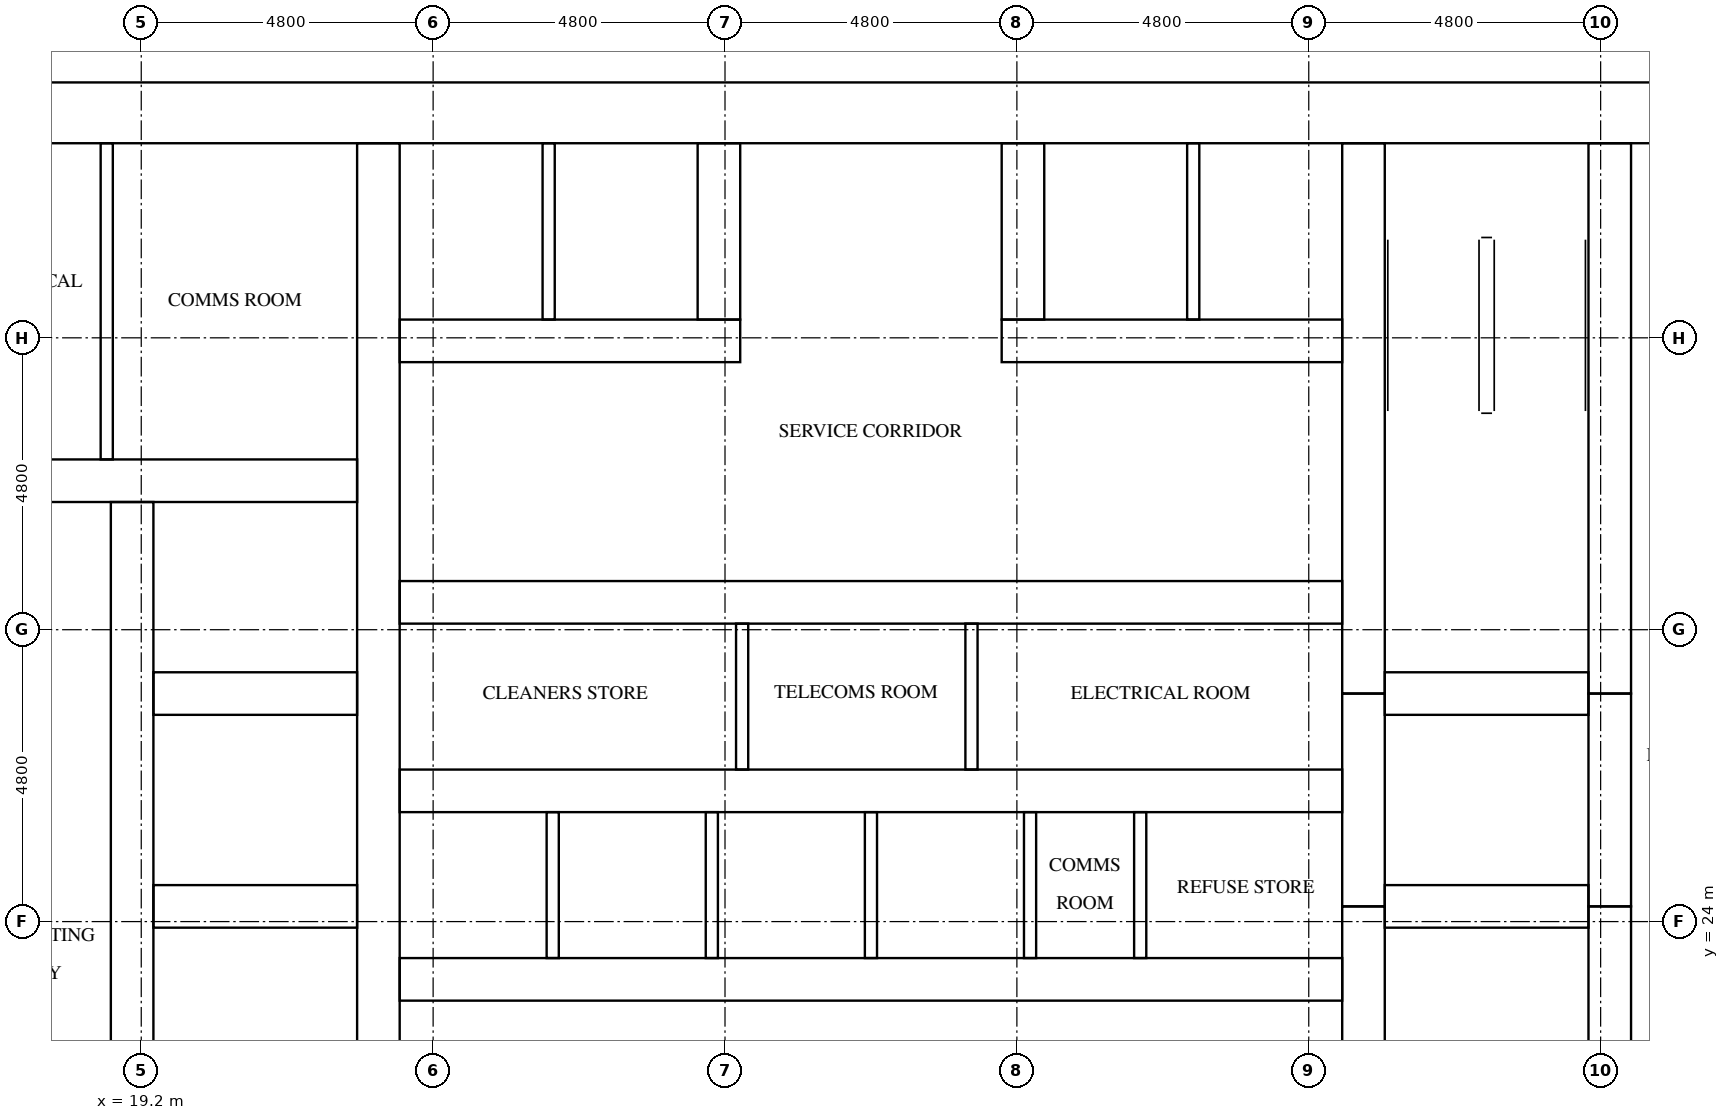
"""IFC4 building model, lengths in metres.
Left out: names, types, materials, properties, quantities, classifications, styles, units other than length and angle.
Written with IfcOpenShell. Run it as: python <this file> out.ifc"""

import sys

from ifc_helpers import new_model, si_unit, direction, frame, frame_2d, origin, place, context, subcontext, project, spatial, rectangle, extrude, element, fill, save


model = new_model("IFC4")
c1 = context("Model", 3, precision=1e-05, world=origin(), true_north=direction((0.0, 1.0)))
c2 = subcontext(c1, "Body", "Model", "MODEL_VIEW")
j1 = project(units=[si_unit("LENGTHUNIT", "METRE"), si_unit("PLANEANGLEUNIT", "RADIAN")], contexts=[c1])
p1 = place(None, origin())
s1 = spatial("IfcSite", under=j1, at=p1, CompositionType="ELEMENT")
p2 = place(p1, origin())
s2 = spatial("IfcBuilding", under=s1, at=p2, CompositionType="ELEMENT")
p3 = place(p2, frame((0.0, 0.0, 32.9)))
s3 = spatial("IfcBuildingStorey", under=s2, at=p3, CompositionType="ELEMENT", Elevation=32.9)
p4 = place(p3, frame((15.0, 37.3, 0.0), z_axis=(0.0, 0.0, 1.0), x_axis=(1.0, 0.0, 0.0)))
e1 = element("IfcWall", 1, at=p4, inside=s3, PredefinedType="SHEAR", context=c2, shape_type="SweptSolid", body=[
    extrude(rectangle(XDim=32.4, YDim=1.0, at=frame_2d((16.2, 0.0))), origin(), (0.0, 0.0, 1.0), 3.2),
])
p5 = place(p4, frame((15.3, 0.0, 0.0)))
e2 = element("IfcOpeningElement", 2, at=p5, cuts=e1, PredefinedType="OPENING", context=c2, shape_type="SweptSolid", body=[
    extrude(rectangle(XDim=1.8, YDim=2.1, at=frame_2d((0.9, 1.05))), frame((0.0, 0.51, 0.0), z_axis=(0.0, -1.0, 0.0), x_axis=(1.0, 0.0, 0.0)), (0.0, 0.0, 1.0), 1.02),
])
p6 = place(p4, frame((1.766, 0.0, 0.0)))
e3 = element("IfcOpeningElement", 3, at=p6, cuts=e1, PredefinedType="OPENING", context=c2, shape_type="SweptSolid", body=[
    extrude(rectangle(XDim=1.0, YDim=2.1, at=frame_2d((0.5, 1.05))), frame((0.0, 0.51, 0.0), z_axis=(0.0, -1.0, 0.0), x_axis=(1.0, 0.0, 0.0)), (0.0, 0.0, 1.0), 1.02),
])
p7 = place(p4, frame((5.241, 0.0, 0.0)))
e4 = element("IfcOpeningElement", 4, at=p7, cuts=e1, PredefinedType="OPENING", context=c2, shape_type="SweptSolid", body=[
    extrude(rectangle(XDim=1.0, YDim=2.1, at=frame_2d((0.5, 1.05))), frame((0.0, 0.51, 0.0), z_axis=(0.0, -1.0, 0.0), x_axis=(1.0, 0.0, 0.0)), (0.0, 0.0, 1.0), 1.02),
])
p8 = place(p3, frame((19.05, 16.0, 0.0), z_axis=(0.0, 0.0, 1.0), x_axis=(0.0, 1.0, 0.0)))
e5 = element("IfcWall", 5, at=p8, inside=s3, PredefinedType="SHEAR", context=c2, shape_type="SweptSolid", body=[
    extrude(rectangle(XDim=14.9, YDim=0.7, at=frame_2d((7.45, 0.0))), origin(), (0.0, 0.0, 1.0), 3.2),
])
p9 = place(p8, frame((9.45, 0.0, 0.0)))
e6 = element("IfcOpeningElement", 6, at=p9, cuts=e5, PredefinedType="OPENING", context=c2, shape_type="SweptSolid", body=[
    extrude(rectangle(XDim=1.1, YDim=2.1, at=frame_2d((0.55, 1.05))), frame((0.0, 0.36, 0.0), z_axis=(0.0, -1.0, 0.0), x_axis=(1.0, 0.0, 0.0)), (0.0, 0.0, 1.0), 0.72),
])
p10 = place(p8, frame((12.95, 0.0, 0.0)))
e7 = element("IfcOpeningElement", 7, at=p10, cuts=e5, PredefinedType="OPENING", context=c2, shape_type="SweptSolid", body=[
    extrude(rectangle(XDim=1.1, YDim=2.1, at=frame_2d((0.55, 1.05))), frame((0.0, 0.36, 0.0), z_axis=(0.0, -1.0, 0.0), x_axis=(1.0, 0.0, 0.0)), (0.0, 0.0, 1.0), 0.72),
])
p11 = place(p8, frame((0.2, 0.0, 0.0)))
e8 = element("IfcOpeningElement", 8, at=p11, cuts=e5, PredefinedType="OPENING", context=c2, shape_type="SweptSolid", body=[
    extrude(rectangle(XDim=1.2, YDim=2.1, at=frame_2d((0.6, 1.05))), frame((0.0, 0.36, 0.0), z_axis=(0.0, -1.0, 0.0), x_axis=(1.0, 0.0, 0.0)), (0.0, 0.0, 1.0), 0.72),
])
p12 = place(p3, frame((23.1, 16.0, 0.0), z_axis=(0.0, 0.0, 1.0), x_axis=(0.0, 1.0, 0.0)))
e9 = element("IfcWall", 9, at=p12, inside=s3, PredefinedType="SHEAR", context=c2, shape_type="SweptSolid", body=[
    extrude(rectangle(XDim=20.8, YDim=0.7, at=frame_2d((10.4, 0.0))), origin(), (0.0, 0.0, 1.0), 3.2),
])
p13 = place(p3, frame((39.3, 16.0, 0.0), z_axis=(0.0, 0.0, 1.0), x_axis=(0.0, 1.0, 0.0)))
e10 = element("IfcWall", 10, at=p13, inside=s3, PredefinedType="SHEAR", context=c2, shape_type="SweptSolid", body=[
    extrude(rectangle(XDim=8.25, YDim=0.7, at=frame_2d((4.125, 0.0))), origin(), (0.0, 0.0, 1.0), 3.2),
])
p14 = place(p3, frame((39.3, 24.25, 0.0), z_axis=(0.0, 0.0, 1.0), x_axis=(0.0, 1.0, 0.0)))
e11 = element("IfcWall", 11, at=p14, inside=s3, PredefinedType="SHEAR", context=c2, shape_type="SweptSolid", body=[
    extrude(rectangle(XDim=3.5, YDim=0.7, at=frame_2d((1.75, 0.0))), origin(), (0.0, 0.0, 1.0), 3.2),
])
p15 = place(p3, frame((39.3, 27.75, 0.0), z_axis=(0.0, 0.0, 1.0), x_axis=(0.0, 1.0, 0.0)))
e12 = element("IfcWall", 12, at=p15, inside=s3, PredefinedType="SHEAR", context=c2, shape_type="SweptSolid", body=[
    extrude(rectangle(XDim=9.05, YDim=0.7, at=frame_2d((4.525, 0.0))), origin(), (0.0, 0.0, 1.0), 3.2),
])
p16 = place(p3, frame((43.35, 16.0, 0.0), z_axis=(0.0, 0.0, 1.0), x_axis=(0.0, 1.0, 0.0)))
e13 = element("IfcWall", 13, at=p16, inside=s3, PredefinedType="SHEAR", context=c2, shape_type="SweptSolid", body=[
    extrude(rectangle(XDim=8.25, YDim=0.7, at=frame_2d((4.125, 0.0))), origin(), (0.0, 0.0, 1.0), 3.2),
])
p17 = place(p16, frame((0.2, 0.0, 0.0)))
e14 = element("IfcOpeningElement", 14, at=p17, cuts=e13, PredefinedType="OPENING", context=c2, shape_type="SweptSolid", body=[
    extrude(rectangle(XDim=1.2, YDim=2.1, at=frame_2d((0.6, 1.05))), frame((0.0, 0.36, 0.0), z_axis=(0.0, -1.0, 0.0), x_axis=(1.0, 0.0, 0.0)), (0.0, 0.0, 1.0), 0.72),
])
p18 = place(p3, frame((43.35, 24.25, 0.0), z_axis=(0.0, 0.0, 1.0), x_axis=(0.0, 1.0, 0.0)))
e15 = element("IfcWall", 15, at=p18, inside=s3, PredefinedType="SHEAR", context=c2, shape_type="SweptSolid", body=[
    extrude(rectangle(XDim=3.5, YDim=0.7, at=frame_2d((1.75, 0.0))), origin(), (0.0, 0.0, 1.0), 3.2),
])
p19 = place(p18, frame((1.2, 0.0, 0.0)))
e16 = element("IfcOpeningElement", 16, at=p19, cuts=e15, PredefinedType="OPENING", context=c2, shape_type="SweptSolid", body=[
    extrude(rectangle(XDim=1.1, YDim=2.1, at=frame_2d((0.55, 1.05))), frame((0.0, 0.36, 0.0), z_axis=(0.0, -1.0, 0.0), x_axis=(1.0, 0.0, 0.0)), (0.0, 0.0, 1.0), 0.72),
])
p20 = place(p3, frame((43.35, 27.75, 0.0), z_axis=(0.0, 0.0, 1.0), x_axis=(0.0, 1.0, 0.0)))
e17 = element("IfcWall", 17, at=p20, inside=s3, PredefinedType="SHEAR", context=c2, shape_type="SweptSolid", body=[
    extrude(rectangle(XDim=9.05, YDim=0.7, at=frame_2d((4.525, 0.0))), origin(), (0.0, 0.0, 1.0), 3.2),
])
p21 = place(p20, frame((7.65, 0.0, 0.0)))
e18 = element("IfcOpeningElement", 18, at=p21, cuts=e17, PredefinedType="OPENING", context=c2, shape_type="SweptSolid", body=[
    extrude(rectangle(XDim=1.2, YDim=2.1, at=frame_2d((0.6, 1.05))), frame((0.0, 0.36, 0.0), z_axis=(0.0, -1.0, 0.0), x_axis=(1.0, 0.0, 0.0)), (0.0, 0.0, 1.0), 0.72),
])
for number, where, z_axis, x_axis in (
    (19, (19.4, 24.25, 0.0), (0.0, 0.0, 1.0), (1.0, 0.0, 0.0)),
    (20, (19.4, 27.75, 0.0), (0.0, 0.0, 1.0), (1.0, 0.0, 0.0)),
):
    element("IfcWall", number, at=place(p3, frame(where, z_axis=z_axis, x_axis=x_axis)), inside=s3, PredefinedType="SHEAR", context=c2, shape_type="SweptSolid", body=[
        extrude(rectangle(XDim=3.35, YDim=0.7, at=frame_2d((1.675, 0.0))), origin(), (0.0, 0.0, 1.0), 3.2),
    ])
p22 = place(p3, frame((16.0, 31.25, 0.0), z_axis=(0.0, 0.0, 1.0), x_axis=(1.0, 0.0, 0.0)))
e21 = element("IfcWall", 21, at=p22, inside=s3, PredefinedType="SHEAR", context=c2, shape_type="SweptSolid", body=[
    extrude(rectangle(XDim=6.75, YDim=0.7, at=frame_2d((3.375, 0.0))), origin(), (0.0, 0.0, 1.0), 3.2),
])
for number, where, z_axis, x_axis in (
    (22, (39.65, 24.25, 0.0), (0.0, 0.0, 1.0), (1.0, 0.0, 0.0)),
    (23, (39.65, 27.75, 0.0), (0.0, 0.0, 1.0), (1.0, 0.0, 0.0)),
):
    element("IfcWall", number, at=place(p3, frame(where, z_axis=z_axis, x_axis=x_axis)), inside=s3, PredefinedType="SHEAR", context=c2, shape_type="SweptSolid", body=[
        extrude(rectangle(XDim=3.35, YDim=0.7, at=frame_2d((1.675, 0.0))), origin(), (0.0, 0.0, 1.0), 3.2),
    ])
p23 = place(p3, frame((23.45, 23.05, 0.0), z_axis=(0.0, 0.0, 1.0), x_axis=(1.0, 0.0, 0.0)))
e24 = element("IfcWall", 24, at=p23, inside=s3, PredefinedType="SHEAR", context=c2, shape_type="SweptSolid", body=[
    extrude(rectangle(XDim=15.5, YDim=0.7, at=frame_2d((7.75, 0.0))), origin(), (0.0, 0.0, 1.0), 3.2),
])
p24 = place(p23, frame((0.658, 0.0, 0.0)))
e25 = element("IfcOpeningElement", 25, at=p24, cuts=e24, PredefinedType="OPENING", context=c2, shape_type="SweptSolid", body=[
    extrude(rectangle(XDim=1.1, YDim=2.1, at=frame_2d((0.55, 1.05))), frame((0.0, 0.36, 0.0), z_axis=(0.0, -1.0, 0.0), x_axis=(1.0, 0.0, 0.0)), (0.0, 0.0, 1.0), 0.72),
])
p25 = place(p23, frame((3.275, 0.0, 0.0)))
e26 = element("IfcOpeningElement", 26, at=p25, cuts=e24, PredefinedType="OPENING", context=c2, shape_type="SweptSolid", body=[
    extrude(rectangle(XDim=1.1, YDim=2.1, at=frame_2d((0.55, 1.05))), frame((0.0, 0.36, 0.0), z_axis=(0.0, -1.0, 0.0), x_axis=(1.0, 0.0, 0.0)), (0.0, 0.0, 1.0), 0.72),
])
p26 = place(p23, frame((10.772, 0.0, 0.0)))
e27 = element("IfcOpeningElement", 27, at=p26, cuts=e24, PredefinedType="OPENING", context=c2, shape_type="SweptSolid", body=[
    extrude(rectangle(XDim=1.0, YDim=2.1, at=frame_2d((0.5, 1.05))), frame((0.0, 0.36, 0.0), z_axis=(0.0, -1.0, 0.0), x_axis=(1.0, 0.0, 0.0)), (0.0, 0.0, 1.0), 0.72),
])
p27 = place(p23, frame((13.389, 0.0, 0.0)))
e28 = element("IfcOpeningElement", 28, at=p27, cuts=e24, PredefinedType="OPENING", context=c2, shape_type="SweptSolid", body=[
    extrude(rectangle(XDim=1.0, YDim=2.1, at=frame_2d((0.5, 1.05))), frame((0.0, 0.36, 0.0), z_axis=(0.0, -1.0, 0.0), x_axis=(1.0, 0.0, 0.0)), (0.0, 0.0, 1.0), 0.72),
])
p28 = place(p3, frame((23.45, 26.15, 0.0), z_axis=(0.0, 0.0, 1.0), x_axis=(1.0, 0.0, 0.0)))
e29 = element("IfcWall", 29, at=p28, inside=s3, PredefinedType="SHEAR", context=c2, shape_type="SweptSolid", body=[
    extrude(rectangle(XDim=15.5, YDim=0.7, at=frame_2d((7.75, 0.0))), origin(), (0.0, 0.0, 1.0), 3.2),
])
p29 = place(p3, frame((23.45, 29.25, 0.0), z_axis=(0.0, 0.0, 1.0), x_axis=(1.0, 0.0, 0.0)))
e30 = element("IfcWall", 30, at=p29, inside=s3, PredefinedType="SHEAR", context=c2, shape_type="SweptSolid", body=[
    extrude(rectangle(XDim=15.5, YDim=0.7, at=frame_2d((7.75, 0.0))), origin(), (0.0, 0.0, 1.0), 3.2),
])
p30 = place(p29, frame((2.266, 0.0, 0.0)))
e31 = element("IfcOpeningElement", 31, at=p30, cuts=e30, PredefinedType="OPENING", context=c2, shape_type="SweptSolid", body=[
    extrude(rectangle(XDim=1.0, YDim=2.1, at=frame_2d((0.5, 1.05))), frame((0.0, 0.36, 0.0), z_axis=(0.0, -1.0, 0.0), x_axis=(1.0, 0.0, 0.0)), (0.0, 0.0, 1.0), 0.72),
])
p31 = place(p29, frame((7.018, 0.0, 0.0)))
e32 = element("IfcOpeningElement", 32, at=p31, cuts=e30, PredefinedType="OPENING", context=c2, shape_type="SweptSolid", body=[
    extrude(rectangle(XDim=1.0, YDim=2.1, at=frame_2d((0.5, 1.05))), frame((0.0, 0.36, 0.0), z_axis=(0.0, -1.0, 0.0), x_axis=(1.0, 0.0, 0.0)), (0.0, 0.0, 1.0), 0.72),
])
p32 = place(p29, frame((12.002, 0.0, 0.0)))
e33 = element("IfcOpeningElement", 33, at=p32, cuts=e30, PredefinedType="OPENING", context=c2, shape_type="SweptSolid", body=[
    extrude(rectangle(XDim=1.0, YDim=2.1, at=frame_2d((0.5, 1.05))), frame((0.0, 0.36, 0.0), z_axis=(0.0, -1.0, 0.0), x_axis=(1.0, 0.0, 0.0)), (0.0, 0.0, 1.0), 0.72),
])
p33 = place(p3, frame((23.45, 33.55, 0.0), z_axis=(0.0, 0.0, 1.0), x_axis=(1.0, 0.0, 0.0)))
e34 = element("IfcWall", 34, at=p33, inside=s3, PredefinedType="SHEAR", context=c2, shape_type="SweptSolid", body=[
    extrude(rectangle(XDim=5.6, YDim=0.7, at=frame_2d((2.8, 0.0))), origin(), (0.0, 0.0, 1.0), 3.2),
])
p34 = place(p3, frame((33.35, 33.55, 0.0), z_axis=(0.0, 0.0, 1.0), x_axis=(1.0, 0.0, 0.0)))
e35 = element("IfcWall", 35, at=p34, inside=s3, PredefinedType="SHEAR", context=c2, shape_type="SweptSolid", body=[
    extrude(rectangle(XDim=5.6, YDim=0.7, at=frame_2d((2.8, 0.0))), origin(), (0.0, 0.0, 1.0), 3.2),
])
for number, where, z_axis, x_axis in (
    (36, (28.7, 33.9, 0.0), (0.0, 0.0, 1.0), (0.0, 1.0, 0.0)),
    (37, (33.7, 33.9, 0.0), (0.0, 0.0, 1.0), (0.0, 1.0, 0.0)),
):
    element("IfcWall", number, at=place(p3, frame(where, z_axis=z_axis, x_axis=x_axis)), inside=s3, PredefinedType="SHEAR", context=c2, shape_type="SweptSolid", body=[
        extrude(rectangle(XDim=2.9, YDim=0.7, at=frame_2d((1.45, 0.0))), origin(), (0.0, 0.0, 1.0), 3.2),
    ])
for number, where, z_axis, x_axis in (
    (38, (25.967, 23.4, 0.0), (0.0, 0.0, 1.0), (0.0, 1.0, 0.0)),
    (39, (28.583, 23.4, 0.0), (0.0, 0.0, 1.0), (0.0, 1.0, 0.0)),
    (40, (31.2, 23.4, 0.0), (0.0, 0.0, 1.0), (0.0, 1.0, 0.0)),
    (41, (33.817, 23.4, 0.0), (0.0, 0.0, 1.0), (0.0, 1.0, 0.0)),
):
    element("IfcWall", number, at=place(p3, frame(where, z_axis=z_axis, x_axis=x_axis)), inside=s3, PredefinedType="SOLIDWALL", context=c2, shape_type="SweptSolid", body=[
        extrude(rectangle(XDim=2.4, YDim=0.2, at=frame_2d((1.2, 0.0))), origin(), (0.0, 0.0, 1.0), 3.2),
    ])
for number, where, z_axis, x_axis in (
    (42, (25.9, 33.9, 0.0), (0.0, 0.0, 1.0), (0.0, 1.0, 0.0)),
    (43, (36.5, 33.9, 0.0), (0.0, 0.0, 1.0), (0.0, 1.0, 0.0)),
):
    element("IfcWall", number, at=place(p3, frame(where, z_axis=z_axis, x_axis=x_axis)), inside=s3, PredefinedType="SOLIDWALL", context=c2, shape_type="SweptSolid", body=[
        extrude(rectangle(XDim=2.9, YDim=0.2, at=frame_2d((1.45, 0.0))), origin(), (0.0, 0.0, 1.0), 3.2),
    ])
p35 = place(p3, frame((18.633, 31.6, 0.0), z_axis=(0.0, 0.0, 1.0), x_axis=(0.0, 1.0, 0.0)))
e44 = element("IfcWall", 44, at=p35, inside=s3, PredefinedType="PARTITIONING", context=c2, shape_type="SweptSolid", body=[
    extrude(rectangle(XDim=5.2, YDim=0.2, at=frame_2d((2.6, 0.0))), origin(), (0.0, 0.0, 1.0), 3.2),
])
p36 = place(p3, frame((35.628, 23.4, 0.0), z_axis=(0.0, 0.0, 1.0), x_axis=(0.0, 1.0, 0.0)))
e45 = element("IfcWall", 45, at=p36, inside=s3, PredefinedType="PARTITIONING", context=c2, shape_type="SweptSolid", body=[
    extrude(rectangle(XDim=2.4, YDim=0.2, at=frame_2d((1.2, 0.0))), origin(), (0.0, 0.0, 1.0), 3.2),
])
for number, where, z_axis, x_axis in (
    (46, (29.082, 26.5, 0.0), (0.0, 0.0, 1.0), (0.0, 1.0, 0.0)),
    (47, (32.853, 26.5, 0.0), (0.0, 0.0, 1.0), (0.0, 1.0, 0.0)),
):
    element("IfcWall", number, at=place(p3, frame(where, z_axis=z_axis, x_axis=x_axis)), inside=s3, PredefinedType="PARTITIONING", context=c2, shape_type="SweptSolid", body=[
        extrude(rectangle(XDim=2.4, YDim=0.2, at=frame_2d((1.2, 0.0))), origin(), (0.0, 0.0, 1.0), 3.2),
    ])
p37 = place(p24, origin())
e48 = element("IfcDoor", 48, at=p37, inside=s3, OperationType="DOUBLE_DOOR_SLIDING", PredefinedType="DOOR", context=c2, shape_type="SweptSolid", body=[
    extrude(rectangle(XDim=1.1, YDim=2.1, at=frame_2d((0.55, 1.05))), frame((0.0, 0.025, 0.0), z_axis=(0.0, -1.0, 0.0), x_axis=(1.0, 0.0, 0.0)), (0.0, 0.0, 1.0), 0.05),
])
fill(e25, e48)
p38 = place(p25, origin())
e49 = element("IfcDoor", 49, at=p38, inside=s3, OperationType="DOUBLE_DOOR_SLIDING", PredefinedType="DOOR", context=c2, shape_type="SweptSolid", body=[
    extrude(rectangle(XDim=1.1, YDim=2.1, at=frame_2d((0.55, 1.05))), frame((0.0, 0.025, 0.0), z_axis=(0.0, -1.0, 0.0), x_axis=(1.0, 0.0, 0.0)), (0.0, 0.0, 1.0), 0.05),
])
fill(e26, e49)
p39 = place(p9, origin())
e50 = element("IfcDoor", 50, at=p39, inside=s3, OperationType="DOUBLE_DOOR_SLIDING", PredefinedType="DOOR", context=c2, shape_type="SweptSolid", body=[
    extrude(rectangle(XDim=1.1, YDim=2.1, at=frame_2d((0.55, 1.05))), frame((0.0, 0.025, 0.0), z_axis=(0.0, -1.0, 0.0), x_axis=(1.0, 0.0, 0.0)), (0.0, 0.0, 1.0), 0.05),
])
fill(e6, e50)
p40 = place(p10, origin())
e51 = element("IfcDoor", 51, at=p40, inside=s3, OperationType="DOUBLE_DOOR_SLIDING", PredefinedType="DOOR", context=c2, shape_type="SweptSolid", body=[
    extrude(rectangle(XDim=1.1, YDim=2.1, at=frame_2d((0.55, 1.05))), frame((0.0, 0.025, 0.0), z_axis=(0.0, -1.0, 0.0), x_axis=(1.0, 0.0, 0.0)), (0.0, 0.0, 1.0), 0.05),
])
fill(e7, e51)
p41 = place(p19, origin())
e52 = element("IfcDoor", 52, at=p41, inside=s3, OperationType="DOUBLE_DOOR_SLIDING", PredefinedType="DOOR", context=c2, shape_type="SweptSolid", body=[
    extrude(rectangle(XDim=1.1, YDim=2.1, at=frame_2d((0.55, 1.05))), frame((0.0, 0.025, 0.0), z_axis=(0.0, -1.0, 0.0), x_axis=(1.0, 0.0, 0.0)), (0.0, 0.0, 1.0), 0.05),
])
fill(e16, e52)
p42 = place(p21, origin())
e53 = element("IfcDoor", 53, at=p42, inside=s3, OperationType="SINGLE_SWING_LEFT", PredefinedType="DOOR", context=c2, shape_type="SweptSolid", body=[
    extrude(rectangle(XDim=1.2, YDim=2.1, at=frame_2d((0.6, 1.05))), frame((0.0, 0.025, 0.0), z_axis=(0.0, -1.0, 0.0), x_axis=(1.0, 0.0, 0.0)), (0.0, 0.0, 1.0), 0.05),
])
fill(e18, e53)
p43 = place(p5, origin())
e54 = element("IfcDoor", 54, at=p43, inside=s3, OperationType="DOUBLE_DOOR_SINGLE_SWING", PredefinedType="DOOR", context=c2, shape_type="SweptSolid", body=[
    extrude(rectangle(XDim=1.8, YDim=2.1, at=frame_2d((0.9, 1.05))), frame((0.0, 0.025, 0.0), z_axis=(0.0, -1.0, 0.0), x_axis=(1.0, 0.0, 0.0)), (0.0, 0.0, 1.0), 0.05),
])
fill(e2, e54)
p44 = place(p6, origin())
e55 = element("IfcDoor", 55, at=p44, inside=s3, OperationType="SINGLE_SWING_RIGHT", PredefinedType="DOOR", context=c2, shape_type="SweptSolid", body=[
    extrude(rectangle(XDim=1.0, YDim=2.1, at=frame_2d((0.5, 1.05))), frame((0.0, 0.025, 0.0), z_axis=(0.0, -1.0, 0.0), x_axis=(1.0, 0.0, 0.0)), (0.0, 0.0, 1.0), 0.05),
])
fill(e3, e55)
p45 = place(p7, origin())
e56 = element("IfcDoor", 56, at=p45, inside=s3, OperationType="SINGLE_SWING_LEFT", PredefinedType="DOOR", context=c2, shape_type="SweptSolid", body=[
    extrude(rectangle(XDim=1.0, YDim=2.1, at=frame_2d((0.5, 1.05))), frame((0.0, 0.025, 0.0), z_axis=(0.0, -1.0, 0.0), x_axis=(1.0, 0.0, 0.0)), (0.0, 0.0, 1.0), 0.05),
])
fill(e4, e56)
p46 = place(p26, frame((1.0, 0.0, 0.0), z_axis=(0.0, 0.0, 1.0), x_axis=(-1.0, 0.0, 0.0)))
e57 = element("IfcDoor", 57, at=p46, inside=s3, OperationType="SINGLE_SWING_RIGHT", PredefinedType="DOOR", context=c2, shape_type="SweptSolid", body=[
    extrude(rectangle(XDim=1.0, YDim=2.1, at=frame_2d((0.5, 1.05))), frame((0.0, 0.025, 0.0), z_axis=(0.0, -1.0, 0.0), x_axis=(1.0, 0.0, 0.0)), (0.0, 0.0, 1.0), 0.05),
])
fill(e27, e57)
p47 = place(p27, frame((1.0, 0.0, 0.0), z_axis=(0.0, 0.0, 1.0), x_axis=(-1.0, 0.0, 0.0)))
e58 = element("IfcDoor", 58, at=p47, inside=s3, OperationType="SINGLE_SWING_LEFT", PredefinedType="DOOR", context=c2, shape_type="SweptSolid", body=[
    extrude(rectangle(XDim=1.0, YDim=2.1, at=frame_2d((0.5, 1.05))), frame((0.0, 0.025, 0.0), z_axis=(0.0, -1.0, 0.0), x_axis=(1.0, 0.0, 0.0)), (0.0, 0.0, 1.0), 0.05),
])
fill(e28, e58)
p48 = place(p30, origin())
e59 = element("IfcDoor", 59, at=p48, inside=s3, OperationType="SINGLE_SWING_RIGHT", PredefinedType="DOOR", context=c2, shape_type="SweptSolid", body=[
    extrude(rectangle(XDim=1.0, YDim=2.1, at=frame_2d((0.5, 1.05))), frame((0.0, 0.025, 0.0), z_axis=(0.0, -1.0, 0.0), x_axis=(1.0, 0.0, 0.0)), (0.0, 0.0, 1.0), 0.05),
])
fill(e31, e59)
p49 = place(p31, origin())
e60 = element("IfcDoor", 60, at=p49, inside=s3, OperationType="SINGLE_SWING_LEFT", PredefinedType="DOOR", context=c2, shape_type="SweptSolid", body=[
    extrude(rectangle(XDim=1.0, YDim=2.1, at=frame_2d((0.5, 1.05))), frame((0.0, 0.025, 0.0), z_axis=(0.0, -1.0, 0.0), x_axis=(1.0, 0.0, 0.0)), (0.0, 0.0, 1.0), 0.05),
])
fill(e32, e60)
p50 = place(p32, origin())
e61 = element("IfcDoor", 61, at=p50, inside=s3, OperationType="SINGLE_SWING_RIGHT", PredefinedType="DOOR", context=c2, shape_type="SweptSolid", body=[
    extrude(rectangle(XDim=1.0, YDim=2.1, at=frame_2d((0.5, 1.05))), frame((0.0, 0.025, 0.0), z_axis=(0.0, -1.0, 0.0), x_axis=(1.0, 0.0, 0.0)), (0.0, 0.0, 1.0), 0.05),
])
fill(e33, e61)
save(model, sys.argv[1])
